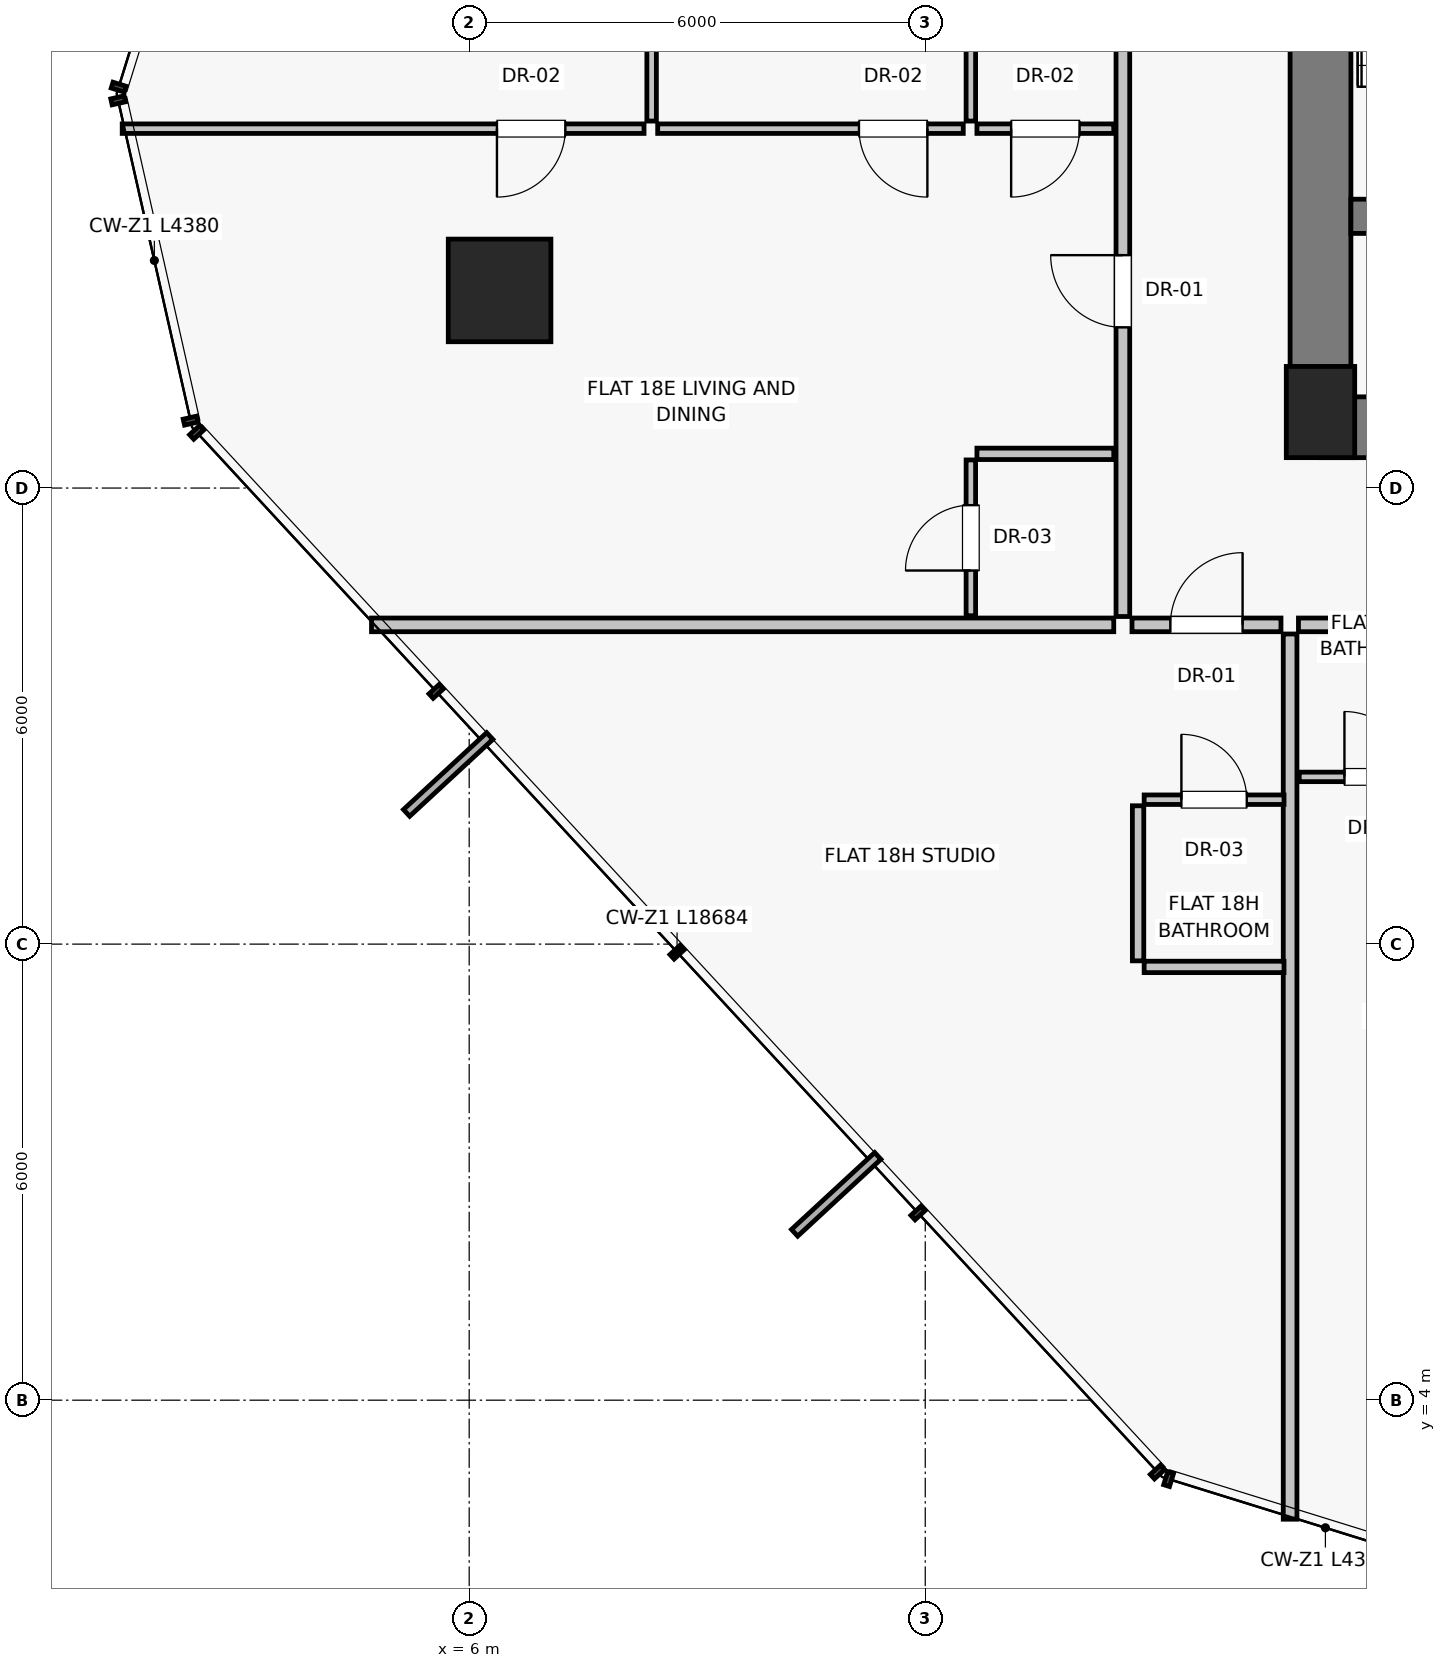
"""IFC4 building model, lengths in metres.
Left out: names, types, materials, properties, quantities, classifications, styles, units other than length and angle.
Written with IfcOpenShell. Run it as: python <this file> out.ifc"""

import sys

from ifc_helpers import new_model, si_unit, direction, frame, frame_2d, origin, origin_2d, place, context, subcontext, project, spatial, rectangle, extrude, source, transform, mapped, element, fill, save


model = new_model("IFC4")
c1 = context("Model", 3, precision=1e-05, world=origin(), true_north=direction((0.0, 1.0)))
c2 = subcontext(c1, "Body", "Model", "MODEL_VIEW")
j1 = project(units=[si_unit("LENGTHUNIT", "METRE"), si_unit("PLANEANGLEUNIT", "RADIAN")], contexts=[c1])
p1 = place(None, origin())
s1 = spatial("IfcSite", under=j1, at=p1, CompositionType="ELEMENT")
p2 = place(p1, origin())
s2 = spatial("IfcBuilding", under=s1, at=p2, CompositionType="ELEMENT")
p3 = place(p2, frame((0.0, 0.0, 67.35)))
s3 = spatial("IfcBuildingStorey", under=s2, at=p3, CompositionType="ELEMENT", Elevation=67.35)
p4 = place(p3, frame((17.2, 17.0, 0.0), z_axis=(0.0, 0.0, 1.0), x_axis=(1.0, 0.0, 0.0)))
e1 = element("IfcColumn", 1, at=p4, inside=s3, PredefinedType="PILASTER", context=c2, shape_type="SweptSolid", body=[
    extrude(rectangle(XDim=0.9, YDim=1.2, at=origin_2d()), origin(), (0.0, 0.0, 1.0), 3.25),
])
p5 = place(p3, frame((6.4, 18.6, 0.0), z_axis=(0.0, 0.0, 1.0), x_axis=(1.0, 0.0, 0.0)))
e2 = element("IfcColumn", 2, at=p5, inside=s3, PredefinedType="COLUMN", context=c2, shape_type="SweptSolid", body=[
    extrude(rectangle(XDim=1.35, YDim=1.35, at=origin_2d()), origin(), (0.0, 0.0, 1.0), 3.25),
])
p6 = place(p3, frame((17.2, 16.8, 0.0), z_axis=(0.0, 0.0, 1.0), x_axis=(0.0, 1.0, 0.0)))
e3 = element("IfcWall", 3, at=p6, inside=s3, PredefinedType="SHEAR", context=c2, shape_type="SweptSolid", body=[
    extrude(rectangle(XDim=14.2, YDim=0.8, at=frame_2d((7.1, 0.0))), origin(), (0.0, 0.0, 1.0), 3.0),
])
p7 = place(p3, frame((17.2, 16.8, 0.0), z_axis=(0.0, 0.0, 1.0), x_axis=(1.0, 0.0, 0.0)))
e4 = element("IfcWall", 4, at=p7, inside=s3, PredefinedType="SHEAR", context=c2, shape_type="SweptSolid", body=[
    extrude(rectangle(XDim=5.85, YDim=0.8, at=frame_2d((2.925, 0.0))), origin(), (0.0, 0.0, 1.0), 3.0),
])
p8 = place(p7, frame((1.15, 0.0, 0.0)))
e5 = element("IfcOpeningElement", 5, at=p8, cuts=e4, PredefinedType="OPENING", context=c2, shape_type="SweptSolid", body=[
    extrude(rectangle(XDim=1.2, YDim=2.03, at=frame_2d((0.6, 1.015))), frame((0.0, 0.41, 0.0), z_axis=(0.0, -1.0, 0.0), x_axis=(1.0, 0.0, 0.0)), (0.0, 0.0, 1.0), 0.82),
])
p9 = place(p3, frame((17.6, 19.575, 0.0), z_axis=(0.0, 0.0, 1.0), x_axis=(1.0, 0.0, 0.0)))
e6 = element("IfcWall", 6, at=p9, inside=s3, PredefinedType="SHEAR", context=c2, shape_type="SweptSolid", body=[
    extrude(rectangle(XDim=3.425, YDim=0.45, at=frame_2d((1.712, 0.0))), origin(), (0.0, 0.0, 1.0), 3.0),
])
p10 = place(p9, frame((1.05, 0.0, 0.0)))
e7 = element("IfcOpeningElement", 7, at=p10, cuts=e6, PredefinedType="OPENING", context=c2, shape_type="SweptSolid", body=[
    extrude(rectangle(XDim=1.1, YDim=2.03, at=frame_2d((0.55, 1.015))), frame((0.0, 0.235, 0.0), z_axis=(0.0, -1.0, 0.0), x_axis=(1.0, 0.0, 0.0)), (0.0, 0.0, 1.0), 0.47),
])
p11 = place(p3, frame((16.8, 14.08, 0.0), z_axis=(0.0, 0.0, 1.0), x_axis=(0.0, -1.0, 0.0)))
e8 = element("IfcWall", 8, at=p11, inside=s3, PredefinedType="PARTITIONING", context=c2, shape_type="SweptSolid", body=[
    extrude(rectangle(XDim=11.646, YDim=0.18, at=frame_2d((5.823, 0.0))), origin(), (0.0, 0.0, 1.0), 3.0),
])
p12 = place(p3, frame((16.91, 14.2, 0.0), z_axis=(0.0, 0.0, 1.0), x_axis=(1.0, 0.0, 0.0)))
e9 = element("IfcWall", 9, at=p12, inside=s3, PredefinedType="PARTITIONING", context=c2, shape_type="SweptSolid", body=[
    extrude(rectangle(XDim=8.372, YDim=0.18, at=frame_2d((4.186, 0.0))), origin(), (0.0, 0.0, 1.0), 3.0),
])
p13 = place(p12, frame((2.903, 0.0, 0.0)))
e10 = element("IfcOpeningElement", 10, at=p13, cuts=e9, PredefinedType="OPENING", context=c2, shape_type="SweptSolid", body=[
    extrude(rectangle(XDim=0.95, YDim=2.02, at=frame_2d((0.475, 1.01))), frame((0.0, 0.1, 0.0), z_axis=(0.0, -1.0, 0.0), x_axis=(1.0, 0.0, 0.0)), (0.0, 0.0, 1.0), 0.2),
])
p14 = place(p3, frame((16.92, 12.2, 0.0), z_axis=(0.0, 0.0, 1.0), x_axis=(1.0, 0.0, 0.0)))
e11 = element("IfcWall", 11, at=p14, inside=s3, PredefinedType="PARTITIONING", context=c2, shape_type="SweptSolid", body=[
    extrude(rectangle(XDim=2.05, YDim=0.125, at=frame_2d((1.025, 0.0))), origin(), (0.0, 0.0, 1.0), 3.0),
])
p15 = place(p14, frame((0.595, 0.0, 0.0)))
e12 = element("IfcOpeningElement", 12, at=p15, cuts=e11, PredefinedType="OPENING", context=c2, shape_type="SweptSolid", body=[
    extrude(rectangle(XDim=0.86, YDim=2.01, at=frame_2d((0.43, 1.005))), frame((0.0, 0.073, 0.0), z_axis=(0.0, -1.0, 0.0), x_axis=(1.0, 0.0, 0.0)), (0.0, 0.0, 1.0), 0.145),
])
p16 = place(p3, frame((14.48, 14.2, 0.0), z_axis=(0.0, 0.0, 1.0), x_axis=(-1.0, 0.0, 0.0)))
e13 = element("IfcWall", 13, at=p16, inside=s3, PredefinedType="PARTITIONING", context=c2, shape_type="SweptSolid", body=[
    extrude(rectangle(XDim=9.765, YDim=0.18, at=frame_2d((4.882, 0.0))), origin(), (0.0, 0.0, 1.0), 3.0),
])
p17 = place(p3, frame((14.6, 14.31, 0.0), z_axis=(0.0, 0.0, 1.0), x_axis=(0.0, 1.0, 0.0)))
e14 = element("IfcWall", 14, at=p17, inside=s3, PredefinedType="PARTITIONING", context=c2, shape_type="SweptSolid", body=[
    extrude(rectangle(XDim=11.438, YDim=0.18, at=frame_2d((5.719, 0.0))), origin(), (0.0, 0.0, 1.0), 3.0),
])
p18 = place(p17, frame((3.804, 0.0, 0.0)))
e15 = element("IfcOpeningElement", 15, at=p18, cuts=e14, PredefinedType="OPENING", context=c2, shape_type="SweptSolid", body=[
    extrude(rectangle(XDim=0.95, YDim=2.02, at=frame_2d((0.475, 1.01))), frame((0.0, 0.1, 0.0), z_axis=(0.0, -1.0, 0.0), x_axis=(1.0, 0.0, 0.0)), (0.0, 0.0, 1.0), 0.2),
])
p19 = place(p3, frame((14.48, 16.45, 0.0), z_axis=(0.0, 0.0, 1.0), x_axis=(-1.0, 0.0, 0.0)))
e16 = element("IfcWall", 16, at=p19, inside=s3, PredefinedType="PARTITIONING", context=c2, shape_type="SweptSolid", body=[
    extrude(rectangle(XDim=1.8, YDim=0.15, at=frame_2d((0.9, 0.0))), origin(), (0.0, 0.0, 1.0), 3.0),
])
p20 = place(p3, frame((12.6, 14.32, 0.0), z_axis=(0.0, 0.0, 1.0), x_axis=(0.0, 1.0, 0.0)))
e17 = element("IfcWall", 17, at=p20, inside=s3, PredefinedType="PARTITIONING", context=c2, shape_type="SweptSolid", body=[
    extrude(rectangle(XDim=2.05, YDim=0.125, at=frame_2d((1.025, 0.0))), origin(), (0.0, 0.0, 1.0), 3.0),
])
p21 = place(p20, frame((0.595, 0.0, 0.0)))
e18 = element("IfcOpeningElement", 18, at=p21, cuts=e17, PredefinedType="OPENING", context=c2, shape_type="SweptSolid", body=[
    extrude(rectangle(XDim=0.86, YDim=2.01, at=frame_2d((0.43, 1.005))), frame((0.0, 0.073, 0.0), z_axis=(0.0, -1.0, 0.0), x_axis=(1.0, 0.0, 0.0)), (0.0, 0.0, 1.0), 0.145),
])
p22 = place(p3, frame((14.48, 20.728, 0.0), z_axis=(0.0, 0.0, 1.0), x_axis=(-1.0, 0.0, 0.0)))
e19 = element("IfcWall", 19, at=p22, inside=s3, PredefinedType="PARTITIONING", context=c2, shape_type="SweptSolid", body=[
    extrude(rectangle(XDim=1.8, YDim=0.125, at=frame_2d((0.9, 0.0))), origin(), (0.0, 0.0, 1.0), 3.0),
])
p23 = place(p22, frame((0.45, 0.0, 0.0)))
e20 = element("IfcOpeningElement", 20, at=p23, cuts=e19, PredefinedType="OPENING", context=c2, shape_type="SweptSolid", body=[
    extrude(rectangle(XDim=0.9, YDim=2.01, at=frame_2d((0.45, 1.005))), frame((0.0, 0.073, 0.0), z_axis=(0.0, -1.0, 0.0), x_axis=(1.0, 0.0, 0.0)), (0.0, 0.0, 1.0), 0.145),
])
for number, where, z_axis, x_axis in (
    (21, (12.6, 20.828, 0.0), (0.0, 0.0, 1.0), (0.0, 1.0, 0.0)),
    (22, (8.4, 20.828, 0.0), (0.0, 0.0, 1.0), (0.0, 1.0, 0.0)),
):
    element("IfcWall", number, at=place(p3, frame(where, z_axis=z_axis, x_axis=x_axis)), inside=s3, PredefinedType="PARTITIONING", context=c2, shape_type="SweptSolid", body=[
        extrude(rectangle(XDim=4.91, YDim=0.125, at=frame_2d((2.455, 0.0))), origin(), (0.0, 0.0, 1.0), 3.0),
    ])
p24 = place(p3, frame((12.5, 20.728, 0.0), z_axis=(0.0, 0.0, 1.0), x_axis=(-1.0, 0.0, 0.0)))
e23 = element("IfcWall", 23, at=p24, inside=s3, PredefinedType="PARTITIONING", context=c2, shape_type="SweptSolid", body=[
    extrude(rectangle(XDim=4.02, YDim=0.125, at=frame_2d((2.01, 0.0))), origin(), (0.0, 0.0, 1.0), 3.0),
])
p25 = place(p24, frame((0.472, 0.0, 0.0)))
e24 = element("IfcOpeningElement", 24, at=p25, cuts=e23, PredefinedType="OPENING", context=c2, shape_type="SweptSolid", body=[
    extrude(rectangle(XDim=0.9, YDim=2.01, at=frame_2d((0.45, 1.005))), frame((0.0, 0.073, 0.0), z_axis=(0.0, -1.0, 0.0), x_axis=(1.0, 0.0, 0.0)), (0.0, 0.0, 1.0), 0.145),
])
p26 = place(p3, frame((8.3, 20.728, 0.0), z_axis=(0.0, 0.0, 1.0), x_axis=(-1.0, 0.0, 0.0)))
e25 = element("IfcWall", 25, at=p26, inside=s3, PredefinedType="PARTITIONING", context=c2, shape_type="SweptSolid", body=[
    extrude(rectangle(XDim=6.865, YDim=0.125, at=frame_2d((3.433, 0.0))), origin(), (0.0, 0.0, 1.0), 3.0),
])
p27 = place(p26, frame((1.035, 0.0, 0.0)))
e26 = element("IfcOpeningElement", 26, at=p27, cuts=e25, PredefinedType="OPENING", context=c2, shape_type="SweptSolid", body=[
    extrude(rectangle(XDim=0.9, YDim=2.01, at=frame_2d((0.45, 1.005))), frame((0.0, 0.073, 0.0), z_axis=(0.0, -1.0, 0.0), x_axis=(1.0, 0.0, 0.0)), (0.0, 0.0, 1.0), 0.145),
])
p28 = place(p3, frame((14.72, 14.2, 0.0), z_axis=(0.0, 0.0, 1.0), x_axis=(1.0, 0.0, 0.0)))
e27 = element("IfcWall", 27, at=p28, inside=s3, PredefinedType="PARTITIONING", context=c2, shape_type="SweptSolid", body=[
    extrude(rectangle(XDim=1.96, YDim=0.18, at=frame_2d((0.98, 0.0))), origin(), (0.0, 0.0, 1.0), 3.0),
])
p29 = place(p28, frame((0.505, 0.0, 0.0)))
e28 = element("IfcOpeningElement", 28, at=p29, cuts=e27, PredefinedType="OPENING", context=c2, shape_type="SweptSolid", body=[
    extrude(rectangle(XDim=0.95, YDim=2.02, at=frame_2d((0.475, 1.01))), frame((0.0, 0.1, 0.0), z_axis=(0.0, -1.0, 0.0), x_axis=(1.0, 0.0, 0.0)), (0.0, 0.0, 1.0), 0.2),
])
p30 = place(p3, frame((14.88, 11.9, 0.0), z_axis=(0.0, 0.0, 1.0), x_axis=(1.0, 0.0, 0.0)))
e29 = element("IfcWall", 29, at=p30, inside=s3, PredefinedType="PARTITIONING", context=c2, shape_type="SweptSolid", body=[
    extrude(rectangle(XDim=1.84, YDim=0.125, at=frame_2d((0.92, 0.0))), origin(), (0.0, 0.0, 1.0), 3.0),
])
p31 = place(p30, frame((0.49, 0.0, 0.0)))
e30 = element("IfcOpeningElement", 30, at=p31, cuts=e29, PredefinedType="OPENING", context=c2, shape_type="SweptSolid", body=[
    extrude(rectangle(XDim=0.86, YDim=2.01, at=frame_2d((0.43, 1.005))), frame((0.0, 0.073, 0.0), z_axis=(0.0, -1.0, 0.0), x_axis=(1.0, 0.0, 0.0)), (0.0, 0.0, 1.0), 0.145),
])
p32 = place(p3, frame((14.88, 9.7, 0.0), z_axis=(0.0, 0.0, 1.0), x_axis=(1.0, 0.0, 0.0)))
e31 = element("IfcWall", 31, at=p32, inside=s3, PredefinedType="PARTITIONING", context=c2, shape_type="SweptSolid", body=[
    extrude(rectangle(XDim=1.84, YDim=0.15, at=frame_2d((0.92, 0.0))), origin(), (0.0, 0.0, 1.0), 3.0),
])
p33 = place(p3, frame((14.8, 9.78, 0.0), z_axis=(0.0, 0.0, 1.0), x_axis=(0.0, 1.0, 0.0)))
e32 = element("IfcWall", 32, at=p33, inside=s3, PredefinedType="PARTITIONING", context=c2, shape_type="SweptSolid", body=[
    extrude(rectangle(XDim=2.04, YDim=0.15, at=frame_2d((1.02, 0.0))), origin(), (0.0, 0.0, 1.0), 3.0),
])
m1 = source(origin(), c2, "Body", "SweptSolid", [
    extrude(rectangle(XDim=0.86, YDim=2.01, at=frame_2d((0.43, 1.005))), frame((0.0, 0.025, 0.0), z_axis=(0.0, -1.0, 0.0), x_axis=(1.0, 0.0, 0.0)), (0.0, 0.0, 1.0), 0.05),
])
p34 = place(p15, origin())
e33 = element("IfcDoor", 33, at=p34, inside=s3, OperationType="SINGLE_SWING_LEFT", PredefinedType="DOOR", context=c2, shape_type="MappedRepresentation", body=[
    mapped(m1, transform((0.0, 0.0, 0.0), scale=1.0)),
])
fill(e12, e33)
m2 = source(origin(), c2, "Body", "SweptSolid", [
    extrude(rectangle(XDim=0.95, YDim=2.02, at=frame_2d((0.475, 1.01))), frame((0.0, 0.025, 0.0), z_axis=(0.0, -1.0, 0.0), x_axis=(1.0, 0.0, 0.0)), (0.0, 0.0, 1.0), 0.05),
])
p35 = place(p18, origin())
e34 = element("IfcDoor", 34, at=p35, inside=s3, OperationType="SINGLE_SWING_RIGHT", PredefinedType="DOOR", context=c2, shape_type="MappedRepresentation", body=[
    mapped(m2, transform((0.0, 0.0, 0.0), scale=1.0)),
])
fill(e15, e34)
p36 = place(p21, origin())
e35 = element("IfcDoor", 35, at=p36, inside=s3, OperationType="SINGLE_SWING_LEFT", PredefinedType="DOOR", context=c2, shape_type="MappedRepresentation", body=[
    mapped(m1, transform((0.0, 0.0, 0.0), scale=1.0)),
])
fill(e18, e35)
m3 = source(origin(), c2, "Body", "SweptSolid", [
    extrude(rectangle(XDim=0.9, YDim=2.01, at=frame_2d((0.45, 1.005))), frame((0.0, 0.025, 0.0), z_axis=(0.0, -1.0, 0.0), x_axis=(1.0, 0.0, 0.0)), (0.0, 0.0, 1.0), 0.05),
])
p37 = place(p23, origin())
e36 = element("IfcDoor", 36, at=p37, inside=s3, OperationType="SINGLE_SWING_RIGHT", PredefinedType="DOOR", context=c2, shape_type="MappedRepresentation", body=[
    mapped(m3, transform((0.0, 0.0, 0.0), scale=1.0)),
])
fill(e20, e36)
p38 = place(p25, origin())
e37 = element("IfcDoor", 37, at=p38, inside=s3, OperationType="SINGLE_SWING_LEFT", PredefinedType="DOOR", context=c2, shape_type="MappedRepresentation", body=[
    mapped(m3, transform((0.0, 0.0, 0.0), scale=1.0)),
])
fill(e24, e37)
p39 = place(p27, origin())
e38 = element("IfcDoor", 38, at=p39, inside=s3, OperationType="SINGLE_SWING_RIGHT", PredefinedType="DOOR", context=c2, shape_type="MappedRepresentation", body=[
    mapped(m3, transform((0.0, 0.0, 0.0), scale=1.0)),
])
fill(e26, e38)
p40 = place(p29, origin())
e39 = element("IfcDoor", 39, at=p40, inside=s3, OperationType="SINGLE_SWING_RIGHT", PredefinedType="DOOR", context=c2, shape_type="MappedRepresentation", body=[
    mapped(m2, transform((0.0, 0.0, 0.0), scale=1.0)),
])
fill(e28, e39)
p41 = place(p31, origin())
e40 = element("IfcDoor", 40, at=p41, inside=s3, OperationType="SINGLE_SWING_LEFT", PredefinedType="DOOR", context=c2, shape_type="MappedRepresentation", body=[
    mapped(m1, transform((0.0, 0.0, 0.0), scale=1.0)),
])
fill(e30, e40)
save(model, sys.argv[1])
